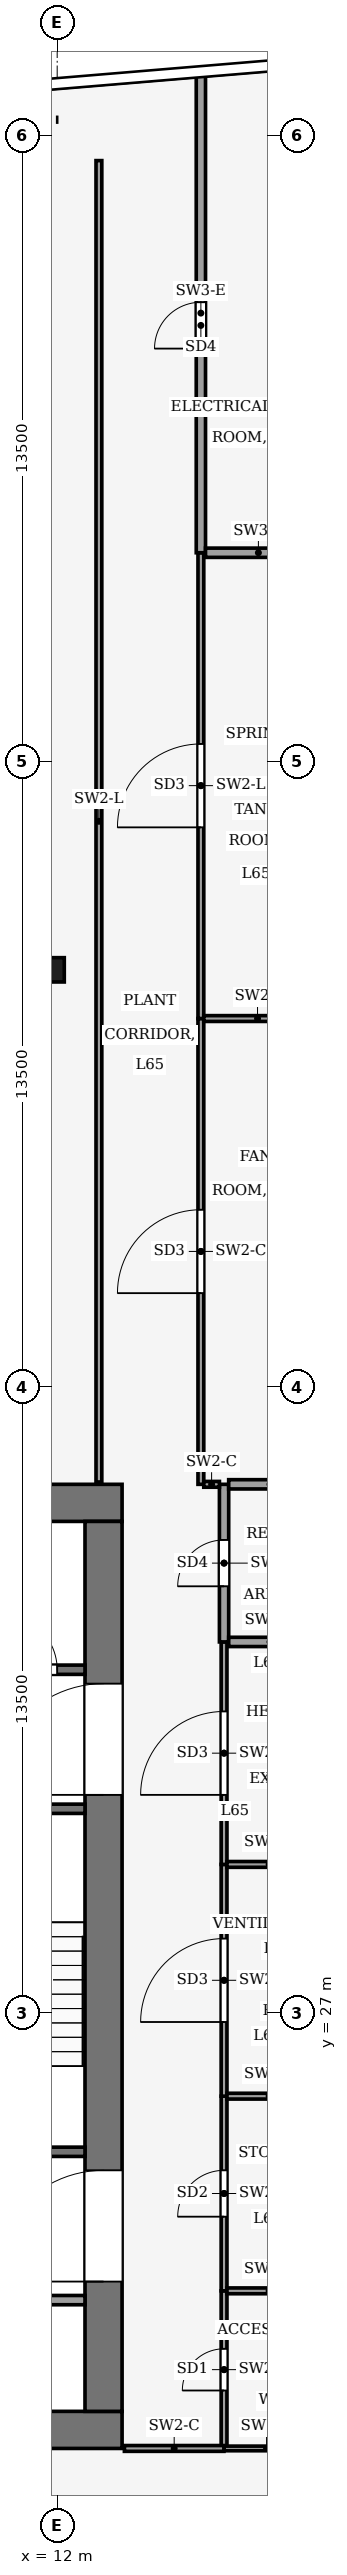
"""IFC4 building model, lengths in metres.
Left out: names, types, materials, properties, quantities, classifications, styles, units other than length and angle.
Written with IfcOpenShell. Run it as: python <this file> out.ifc"""

import sys

from ifc_helpers import new_model, si_unit, direction, frame, frame_2d, origin, origin_2d, place, context, subcontext, project, spatial, rectangle, hollow_rectangle, i_section, extrude, element, fill, save


model = new_model("IFC4")
c1 = context("Model", 3, precision=1e-05, world=origin(), true_north=direction((0.0, 1.0)))
c2 = subcontext(c1, "Body", "Model", "MODEL_VIEW")
j1 = project(units=[si_unit("LENGTHUNIT", "METRE"), si_unit("PLANEANGLEUNIT", "RADIAN")], contexts=[c1])
p1 = place(None, origin())
s1 = spatial("IfcSite", under=j1, at=p1, CompositionType="ELEMENT")
p2 = place(p1, origin())
s2 = spatial("IfcBuilding", under=s1, at=p2, CompositionType="ELEMENT")
p3 = place(p2, frame((0.0, 0.0, 282.0)))
s3 = spatial("IfcBuildingStorey", under=s2, at=p3, CompositionType="ELEMENT", Elevation=282.0)
for number, where, z_axis, x_axis in (
    (1, (-13.4, 18.0, -0.25), (0.0, 0.0, 1.0), (1.0, 0.0, 0.0)),
    (2, (-13.4, 38.0, -0.25), (0.0, 0.0, 1.0), (1.0, 0.0, 0.0)),
):
    element("IfcWall", number, at=place(p3, frame(where, z_axis=z_axis, x_axis=x_axis)), inside=s3, PredefinedType="SHEAR", context=c2, shape_type="SweptSolid", body=[
        extrude(rectangle(XDim=26.8, YDim=0.8, at=frame_2d((13.4, 0.0))), origin(), (0.0, 0.0, 1.0), 7.12),
    ])
p4 = place(p3, frame((13.0, 18.4, -0.25), z_axis=(0.0, 0.0, 1.0), x_axis=(0.0, 1.0, 0.0)))
e3 = element("IfcWall", 3, at=p4, inside=s3, PredefinedType="SHEAR", context=c2, shape_type="SweptSolid", body=[
    extrude(rectangle(XDim=19.2, YDim=0.8, at=frame_2d((9.6, 0.0))), origin(), (0.0, 0.0, 1.0), 7.12),
])
p5 = place(p4, frame((2.8, 0.0, 0.25)))
e4 = element("IfcOpeningElement", 4, at=p5, cuts=e3, PredefinedType="OPENING", context=c2, shape_type="SweptSolid", body=[
    extrude(rectangle(XDim=2.4, YDim=2.4, at=frame_2d((1.2, 1.2))), frame((0.0, 0.41, 0.0), z_axis=(0.0, -1.0, 0.0), x_axis=(1.0, 0.0, 0.0)), (0.0, 0.0, 1.0), 0.82),
])
p6 = place(p4, frame((13.3, 0.0, 0.25)))
e5 = element("IfcOpeningElement", 5, at=p6, cuts=e3, PredefinedType="OPENING", context=c2, shape_type="SweptSolid", body=[
    extrude(rectangle(XDim=2.4, YDim=2.4, at=frame_2d((1.2, 1.2))), frame((0.0, 0.41, 0.0), z_axis=(0.0, -1.0, 0.0), x_axis=(1.0, 0.0, 0.0)), (0.0, 0.0, 1.0), 0.82),
])
p7 = place(p3, frame((12.0, 67.75, 0.029), z_axis=(0.0, 0.025979412411, 0.999662478105), x_axis=(-1.0, 0.0, 0.0)))
e6 = element("IfcColumn", 6, at=p7, inside=s3, PredefinedType="COLUMN", context=c2, shape_type="SweptSolid", body=[
    extrude(hollow_rectangle(XDim=0.6, YDim=0.6, WallThickness=0.025, at=origin_2d()), origin(), (0.0, 0.0, 1.0), 6.945),
])
p8 = place(p3, frame((12.0, 49.5, 0.0), z_axis=(0.0, 0.0, 1.0), x_axis=(1.0, 0.0, 0.0)))
e7 = element("IfcColumn", 7, at=p8, inside=s3, PredefinedType="COLUMN", context=c2, shape_type="SweptSolid", body=[
    extrude(i_section(OverallWidth=0.306, OverallDepth=0.524, WebThickness=0.012, FlangeThickness=0.04, FilletRadius=0.027, at=origin_2d()), origin(), (0.0, 0.0, 1.0), 7.0),
])
p9 = place(p3, frame((6.0, 20.8, 0.0), z_axis=(0.0, 0.0, 1.0), x_axis=(1.0, 0.0, 0.0)))
e8 = element("IfcWall", 8, at=p9, inside=s3, PredefinedType="PARTITIONING", context=c2, shape_type="SweptSolid", body=[
    extrude(rectangle(XDim=6.6, YDim=0.2, at=frame_2d((3.3, 0.0))), origin(), (0.0, 0.0, 1.0), 6.87),
])
p10 = place(p9, frame((2.8, 0.0, 0.0)))
e9 = element("IfcOpeningElement", 9, at=p10, cuts=e8, PredefinedType="OPENING", context=c2, shape_type="SweptSolid", body=[
    extrude(rectangle(XDim=1.0, YDim=2.1, at=frame_2d((0.5, 1.05))), frame((0.0, 0.11, 0.0), z_axis=(0.0, -1.0, 0.0), x_axis=(1.0, 0.0, 0.0)), (0.0, 0.0, 1.0), 0.22),
])
p11 = place(p3, frame((6.0, 24.0, 0.0), z_axis=(0.0, 0.0, 1.0), x_axis=(1.0, 0.0, 0.0)))
e10 = element("IfcWall", 10, at=p11, inside=s3, PredefinedType="PARTITIONING", context=c2, shape_type="SweptSolid", body=[
    extrude(rectangle(XDim=6.6, YDim=0.2, at=frame_2d((3.3, 0.0))), origin(), (0.0, 0.0, 1.0), 6.87),
])
p12 = place(p11, frame((0.9, 0.0, 0.0)))
e11 = element("IfcOpeningElement", 11, at=p12, cuts=e10, PredefinedType="OPENING", context=c2, shape_type="SweptSolid", body=[
    extrude(rectangle(XDim=1.0, YDim=2.1, at=frame_2d((0.5, 1.05))), frame((0.0, 0.11, 0.0), z_axis=(0.0, -1.0, 0.0), x_axis=(1.0, 0.0, 0.0)), (0.0, 0.0, 1.0), 0.22),
])
p13 = place(p11, frame((4.4, 0.0, 0.0)))
e12 = element("IfcOpeningElement", 12, at=p13, cuts=e10, PredefinedType="OPENING", context=c2, shape_type="SweptSolid", body=[
    extrude(rectangle(XDim=1.2, YDim=2.2, at=frame_2d((0.6, 1.1))), frame((0.0, 0.11, 0.0), z_axis=(0.0, -1.0, 0.0), x_axis=(1.0, 0.0, 0.0)), (0.0, 0.0, 1.0), 0.22),
])
p14 = place(p3, frame((6.0, 31.4, 0.0), z_axis=(0.0, 0.0, 1.0), x_axis=(1.0, 0.0, 0.0)))
e13 = element("IfcWall", 13, at=p14, inside=s3, PredefinedType="PARTITIONING", context=c2, shape_type="SweptSolid", body=[
    extrude(rectangle(XDim=6.6, YDim=0.2, at=frame_2d((3.3, 0.0))), origin(), (0.0, 0.0, 1.0), 6.87),
])
p15 = place(p3, frame((6.0, 34.4, 0.0), z_axis=(0.0, 0.0, 1.0), x_axis=(1.0, 0.0, 0.0)))
e14 = element("IfcWall", 14, at=p15, inside=s3, PredefinedType="PARTITIONING", context=c2, shape_type="SweptSolid", body=[
    extrude(rectangle(XDim=6.6, YDim=0.2, at=frame_2d((3.3, 0.0))), origin(), (0.0, 0.0, 1.0), 6.87),
])
p16 = place(p15, frame((4.8, 0.0, 0.0)))
e15 = element("IfcOpeningElement", 15, at=p16, cuts=e14, PredefinedType="OPENING", context=c2, shape_type="SweptSolid", body=[
    extrude(rectangle(XDim=1.2, YDim=2.2, at=frame_2d((0.6, 1.1))), frame((0.0, 0.11, 0.0), z_axis=(0.0, -1.0, 0.0), x_axis=(1.0, 0.0, 0.0)), (0.0, 0.0, 1.0), 0.22),
])
p17 = place(p3, frame((15.6, 17.6, 0.0), z_axis=(0.0, 0.0, 1.0), x_axis=(0.0, 1.0, 0.0)))
e16 = element("IfcWall", 16, at=p17, inside=s3, PredefinedType="PARTITIONING", context=c2, shape_type="SweptSolid", body=[
    extrude(rectangle(XDim=3.4, YDim=0.125, at=frame_2d((1.7, 0.0))), origin(), (0.0, 0.0, 1.0), 6.14),
])
p18 = place(p17, frame((1.25, 0.0, 0.0)))
e17 = element("IfcOpeningElement", 17, at=p18, cuts=e16, PredefinedType="OPENING", context=c2, shape_type="SweptSolid", body=[
    extrude(rectangle(XDim=0.9, YDim=2.1, at=frame_2d((0.45, 1.05))), frame((0.0, 0.073, 0.0), z_axis=(0.0, -1.0, 0.0), x_axis=(1.0, 0.0, 0.0)), (0.0, 0.0, 1.0), 0.145),
])
p19 = place(p3, frame((15.6, 21.0, 0.0), z_axis=(0.0, 0.0, 1.0), x_axis=(0.0, 1.0, 0.0)))
e18 = element("IfcWall", 18, at=p19, inside=s3, PredefinedType="PARTITIONING", context=c2, shape_type="SweptSolid", body=[
    extrude(rectangle(XDim=4.2, YDim=0.125, at=frame_2d((2.1, 0.0))), origin(), (0.0, 0.0, 1.0), 6.48),
])
p20 = place(p19, frame((1.6, 0.0, 0.0)))
e19 = element("IfcOpeningElement", 19, at=p20, cuts=e18, PredefinedType="OPENING", context=c2, shape_type="SweptSolid", body=[
    extrude(rectangle(XDim=1.0, YDim=2.1, at=frame_2d((0.5, 1.05))), frame((0.0, 0.073, 0.0), z_axis=(0.0, -1.0, 0.0), x_axis=(1.0, 0.0, 0.0)), (0.0, 0.0, 1.0), 0.145),
])
p21 = place(p3, frame((15.6, 25.2, 0.0), z_axis=(0.0, 0.0, 1.0), x_axis=(0.0, 1.0, 0.0)))
e20 = element("IfcWall", 20, at=p21, inside=s3, PredefinedType="PARTITIONING", context=c2, shape_type="SweptSolid", body=[
    extrude(rectangle(XDim=5.0, YDim=0.125, at=frame_2d((2.5, 0.0))), origin(), (0.0, 0.0, 1.0), 6.48),
])
p22 = place(p21, frame((1.6, 0.0, 0.0)))
e21 = element("IfcOpeningElement", 21, at=p22, cuts=e20, PredefinedType="OPENING", context=c2, shape_type="SweptSolid", body=[
    extrude(rectangle(XDim=1.8, YDim=2.4, at=frame_2d((0.9, 1.2))), frame((0.0, 0.073, 0.0), z_axis=(0.0, -1.0, 0.0), x_axis=(1.0, 0.0, 0.0)), (0.0, 0.0, 1.0), 0.145),
])
p23 = place(p3, frame((15.6, 30.2, 0.0), z_axis=(0.0, 0.0, 1.0), x_axis=(0.0, 1.0, 0.0)))
e22 = element("IfcWall", 22, at=p23, inside=s3, PredefinedType="PARTITIONING", context=c2, shape_type="SweptSolid", body=[
    extrude(rectangle(XDim=4.8, YDim=0.125, at=frame_2d((2.4, 0.0))), origin(), (0.0, 0.0, 1.0), 6.48),
])
p24 = place(p23, frame((1.5, 0.0, 0.0)))
e23 = element("IfcOpeningElement", 23, at=p24, cuts=e22, PredefinedType="OPENING", context=c2, shape_type="SweptSolid", body=[
    extrude(rectangle(XDim=1.8, YDim=2.4, at=frame_2d((0.9, 1.2))), frame((0.0, 0.073, 0.0), z_axis=(0.0, -1.0, 0.0), x_axis=(1.0, 0.0, 0.0)), (0.0, 0.0, 1.0), 0.145),
])
p25 = place(p3, frame((15.6, 35.0, 0.0), z_axis=(0.0, 0.0, 1.0), x_axis=(0.0, 1.0, 0.0)))
e24 = element("IfcWall", 24, at=p25, inside=s3, PredefinedType="PARTITIONING", context=c2, shape_type="SweptSolid", body=[
    extrude(rectangle(XDim=3.4, YDim=0.2, at=frame_2d((1.7, 0.0))), origin(), (0.0, 0.0, 1.0), 6.14),
])
p26 = place(p25, frame((1.2, 0.0, 0.0)))
e25 = element("IfcOpeningElement", 25, at=p26, cuts=e24, PredefinedType="OPENING", context=c2, shape_type="SweptSolid", body=[
    extrude(rectangle(XDim=1.0, YDim=2.1, at=frame_2d((0.5, 1.05))), frame((0.0, 0.11, 0.0), z_axis=(0.0, -1.0, 0.0), x_axis=(1.0, 0.0, 0.0)), (0.0, 0.0, 1.0), 0.22),
])
p27 = place(p3, frame((15.1, 38.4, 0.0), z_axis=(0.0, 0.0, 1.0), x_axis=(0.0, 1.0, 0.0)))
e26 = element("IfcWall", 26, at=p27, inside=s3, PredefinedType="PARTITIONING", context=c2, shape_type="SweptSolid", body=[
    extrude(rectangle(XDim=10.049, YDim=0.125, at=frame_2d((5.024, 0.0))), origin(), (0.0, 0.0, 1.0), 6.14),
])
p28 = place(p27, frame((4.125, 0.0, 0.0)))
e27 = element("IfcOpeningElement", 27, at=p28, cuts=e26, PredefinedType="OPENING", context=c2, shape_type="SweptSolid", body=[
    extrude(rectangle(XDim=1.8, YDim=2.4, at=frame_2d((0.9, 1.2))), frame((0.0, 0.073, 0.0), z_axis=(0.0, -1.0, 0.0), x_axis=(1.0, 0.0, 0.0)), (0.0, 0.0, 1.0), 0.145),
])
p29 = place(p3, frame((15.163, 38.4, 0.0), z_axis=(0.0, 0.0, 1.0), x_axis=(1.0, 0.0, 0.0)))
e28 = element("IfcWall", 28, at=p29, inside=s3, PredefinedType="PARTITIONING", context=c2, shape_type="SweptSolid", body=[
    extrude(rectangle(XDim=0.337, YDim=0.125, at=frame_2d((0.169, 0.0))), origin(), (0.0, 0.0, 1.0), 6.14),
])
p30 = place(p3, frame((15.1, 48.449, 0.0), z_axis=(0.0, 0.0, 1.0), x_axis=(0.0, 1.0, 0.0)))
e29 = element("IfcWall", 29, at=p30, inside=s3, PredefinedType="PARTITIONING", context=c2, shape_type="SweptSolid", body=[
    extrude(rectangle(XDim=10.049, YDim=0.125, at=frame_2d((5.024, 0.0))), origin(), (0.0, 0.0, 1.0), 6.35),
])
p31 = place(p30, frame((4.125, 0.0, 0.0)))
e30 = element("IfcOpeningElement", 30, at=p31, cuts=e29, PredefinedType="OPENING", context=c2, shape_type="SweptSolid", body=[
    extrude(rectangle(XDim=1.8, YDim=2.4, at=frame_2d((0.9, 1.2))), frame((0.0, 0.073, 0.0), z_axis=(0.0, -1.0, 0.0), x_axis=(1.0, 0.0, 0.0)), (0.0, 0.0, 1.0), 0.145),
])
p32 = place(p3, frame((15.1, 58.498, 0.0), z_axis=(0.0, 0.0, 1.0), x_axis=(0.0, 1.0, 0.0)))
e31 = element("IfcWall", 31, at=p32, inside=s3, PredefinedType="PARTITIONING", context=c2, shape_type="SweptSolid", body=[
    extrude(rectangle(XDim=10.34, YDim=0.2, at=frame_2d((5.17, 0.0))), origin(), (0.0, 0.0, 1.0), 6.04),
])
p33 = place(p32, frame((4.405, 0.0, 0.0)))
e32 = element("IfcOpeningElement", 32, at=p33, cuts=e31, PredefinedType="OPENING", context=c2, shape_type="SweptSolid", body=[
    extrude(rectangle(XDim=1.0, YDim=2.1, at=frame_2d((0.5, 1.05))), frame((0.0, 0.11, 0.0), z_axis=(0.0, -1.0, 0.0), x_axis=(1.0, 0.0, 0.0)), (0.0, 0.0, 1.0), 0.22),
])
for number, where, z_axis, x_axis in (
    (33, (15.663, 21.0, 0.0), (0.0, 0.0, 1.0), (1.0, 0.0, 0.0)),
    (34, (15.663, 25.2, 0.0), (0.0, 0.0, 1.0), (1.0, 0.0, 0.0)),
    (35, (15.663, 30.2, 0.0), (0.0, 0.0, 1.0), (1.0, 0.0, 0.0)),
):
    element("IfcWall", number, at=place(p3, frame(where, z_axis=z_axis, x_axis=x_axis)), inside=s3, PredefinedType="PARTITIONING", context=c2, shape_type="SweptSolid", body=[
        extrude(rectangle(XDim=1.819, YDim=0.125, at=frame_2d((0.91, 0.0))), origin(), (0.0, 0.0, 1.0), 6.87),
    ])
p34 = place(p3, frame((15.7, 35.0, 0.0), z_axis=(0.0, 0.0, 1.0), x_axis=(1.0, 0.0, 0.0)))
e36 = element("IfcWall", 36, at=p34, inside=s3, PredefinedType="PARTITIONING", context=c2, shape_type="SweptSolid", body=[
    extrude(rectangle(XDim=1.782, YDim=0.2, at=frame_2d((0.891, 0.0))), origin(), (0.0, 0.0, 1.0), 6.87),
])
p35 = place(p3, frame((15.7, 38.4, 0.0), z_axis=(0.0, 0.0, 1.0), x_axis=(1.0, 0.0, 0.0)))
e37 = element("IfcWall", 37, at=p35, inside=s3, PredefinedType="PARTITIONING", context=c2, shape_type="SweptSolid", body=[
    extrude(rectangle(XDim=1.782, YDim=0.2, at=frame_2d((0.891, 0.0))), origin(), (0.0, 0.0, 1.0), 6.14),
])
p36 = place(p3, frame((15.163, 48.449, 0.0), z_axis=(0.0, 0.0, 1.0), x_axis=(1.0, 0.0, 0.0)))
e38 = element("IfcWall", 38, at=p36, inside=s3, PredefinedType="PARTITIONING", context=c2, shape_type="SweptSolid", body=[
    extrude(rectangle(XDim=2.319, YDim=0.125, at=frame_2d((1.16, 0.0))), origin(), (0.0, 0.0, 1.0), 6.39),
])
p37 = place(p3, frame((15.2, 58.498, 0.0), z_axis=(0.0, 0.0, 1.0), x_axis=(1.0, 0.0, 0.0)))
e39 = element("IfcWall", 39, at=p37, inside=s3, PredefinedType="PARTITIONING", context=c2, shape_type="SweptSolid", body=[
    extrude(rectangle(XDim=2.282, YDim=0.2, at=frame_2d((1.141, 0.0))), origin(), (0.0, 0.0, 1.0), 6.24),
])
p38 = place(p3, frame((12.9, 38.45, 0.0), z_axis=(0.0, 0.0, 1.0), x_axis=(0.0, 1.0, 0.0)))
e40 = element("IfcWall", 40, at=p38, inside=s3, PredefinedType="PARTITIONING", context=c2, shape_type="SweptSolid", body=[
    extrude(rectangle(XDim=28.508, YDim=0.125, at=frame_2d((14.254, 0.0))), origin(), (0.0, 0.0, 1.0), 6.35),
])
p39 = place(p3, frame((15.598, 17.6, 0.0), z_axis=(0.0, 0.0, 1.0), x_axis=(-1.0, 0.0, 0.0)))
e41 = element("IfcWall", 41, at=p39, inside=s3, PredefinedType="PARTITIONING", context=c2, shape_type="SweptSolid", body=[
    extrude(rectangle(XDim=2.148, YDim=0.125, at=frame_2d((1.074, 0.0))), origin(), (0.0, 0.0, 1.0), 6.14),
])
p40 = place(p3, frame((17.432, 17.6, 0.0), z_axis=(0.0, 0.0, 1.0), x_axis=(-1.0, 0.0, 0.0)))
e42 = element("IfcWall", 42, at=p40, inside=s3, PredefinedType="PARTITIONING", context=c2, shape_type="SweptSolid", body=[
    extrude(rectangle(XDim=1.83, YDim=0.1, at=frame_2d((0.915, 0.0))), origin(), (0.0, 0.0, 1.0), 6.14),
])
p41 = place(p16, origin())
e43 = element("IfcDoor", 43, at=p41, inside=s3, OperationType="SINGLE_SWING_LEFT", PredefinedType="DOOR", context=c2, shape_type="SweptSolid", body=[
    extrude(rectangle(XDim=1.2, YDim=2.2, at=frame_2d((0.6, 1.1))), frame((0.0, 0.025, 0.0), z_axis=(0.0, -1.0, 0.0), x_axis=(1.0, 0.0, 0.0)), (0.0, 0.0, 1.0), 0.05),
])
fill(e15, e43)
p42 = place(p5, origin())
e44 = element("IfcDoor", 44, at=p42, inside=s3, OperationType="DOUBLE_DOOR_SINGLE_SWING", PredefinedType="DOOR", context=c2, shape_type="SweptSolid", body=[
    extrude(rectangle(XDim=2.4, YDim=2.4, at=frame_2d((1.2, 1.2))), frame((0.0, 0.025, 0.0), z_axis=(0.0, -1.0, 0.0), x_axis=(1.0, 0.0, 0.0)), (0.0, 0.0, 1.0), 0.05),
])
fill(e4, e44)
p43 = place(p6, origin())
e45 = element("IfcDoor", 45, at=p43, inside=s3, OperationType="DOUBLE_DOOR_SINGLE_SWING", PredefinedType="DOOR", context=c2, shape_type="SweptSolid", body=[
    extrude(rectangle(XDim=2.4, YDim=2.4, at=frame_2d((1.2, 1.2))), frame((0.0, 0.025, 0.0), z_axis=(0.0, -1.0, 0.0), x_axis=(1.0, 0.0, 0.0)), (0.0, 0.0, 1.0), 0.05),
])
fill(e5, e45)
p44 = place(p18, origin())
e46 = element("IfcDoor", 46, at=p44, inside=s3, OperationType="SINGLE_SWING_LEFT", PredefinedType="DOOR", context=c2, shape_type="SweptSolid", body=[
    extrude(rectangle(XDim=0.9, YDim=2.1, at=frame_2d((0.45, 1.05))), frame((0.0, 0.025, 0.0), z_axis=(0.0, -1.0, 0.0), x_axis=(1.0, 0.0, 0.0)), (0.0, 0.0, 1.0), 0.05),
])
fill(e17, e46)
p45 = place(p20, origin())
e47 = element("IfcDoor", 47, at=p45, inside=s3, OperationType="SINGLE_SWING_RIGHT", PredefinedType="DOOR", context=c2, shape_type="SweptSolid", body=[
    extrude(rectangle(XDim=1.0, YDim=2.1, at=frame_2d((0.5, 1.05))), frame((0.0, 0.025, 0.0), z_axis=(0.0, -1.0, 0.0), x_axis=(1.0, 0.0, 0.0)), (0.0, 0.0, 1.0), 0.05),
])
fill(e19, e47)
p46 = place(p22, origin())
e48 = element("IfcDoor", 48, at=p46, inside=s3, OperationType="DOUBLE_DOOR_SINGLE_SWING", PredefinedType="DOOR", context=c2, shape_type="SweptSolid", body=[
    extrude(rectangle(XDim=1.8, YDim=2.4, at=frame_2d((0.9, 1.2))), frame((0.0, 0.025, 0.0), z_axis=(0.0, -1.0, 0.0), x_axis=(1.0, 0.0, 0.0)), (0.0, 0.0, 1.0), 0.05),
])
fill(e21, e48)
p47 = place(p24, origin())
e49 = element("IfcDoor", 49, at=p47, inside=s3, OperationType="DOUBLE_DOOR_SINGLE_SWING", PredefinedType="DOOR", context=c2, shape_type="SweptSolid", body=[
    extrude(rectangle(XDim=1.8, YDim=2.4, at=frame_2d((0.9, 1.2))), frame((0.0, 0.025, 0.0), z_axis=(0.0, -1.0, 0.0), x_axis=(1.0, 0.0, 0.0)), (0.0, 0.0, 1.0), 0.05),
])
fill(e23, e49)
p48 = place(p26, origin())
e50 = element("IfcDoor", 50, at=p48, inside=s3, OperationType="SINGLE_SWING_LEFT", PredefinedType="DOOR", context=c2, shape_type="SweptSolid", body=[
    extrude(rectangle(XDim=1.0, YDim=2.1, at=frame_2d((0.5, 1.05))), frame((0.0, 0.025, 0.0), z_axis=(0.0, -1.0, 0.0), x_axis=(1.0, 0.0, 0.0)), (0.0, 0.0, 1.0), 0.05),
])
fill(e25, e50)
p49 = place(p28, origin())
e51 = element("IfcDoor", 51, at=p49, inside=s3, OperationType="DOUBLE_DOOR_SINGLE_SWING", PredefinedType="DOOR", context=c2, shape_type="SweptSolid", body=[
    extrude(rectangle(XDim=1.8, YDim=2.4, at=frame_2d((0.9, 1.2))), frame((0.0, 0.025, 0.0), z_axis=(0.0, -1.0, 0.0), x_axis=(1.0, 0.0, 0.0)), (0.0, 0.0, 1.0), 0.05),
])
fill(e27, e51)
p50 = place(p31, origin())
e52 = element("IfcDoor", 52, at=p50, inside=s3, OperationType="DOUBLE_DOOR_SINGLE_SWING", PredefinedType="DOOR", context=c2, shape_type="SweptSolid", body=[
    extrude(rectangle(XDim=1.8, YDim=2.4, at=frame_2d((0.9, 1.2))), frame((0.0, 0.025, 0.0), z_axis=(0.0, -1.0, 0.0), x_axis=(1.0, 0.0, 0.0)), (0.0, 0.0, 1.0), 0.05),
])
fill(e30, e52)
p51 = place(p33, origin())
e53 = element("IfcDoor", 53, at=p51, inside=s3, OperationType="SINGLE_SWING_LEFT", PredefinedType="DOOR", context=c2, shape_type="SweptSolid", body=[
    extrude(rectangle(XDim=1.0, YDim=2.1, at=frame_2d((0.5, 1.05))), frame((0.0, 0.025, 0.0), z_axis=(0.0, -1.0, 0.0), x_axis=(1.0, 0.0, 0.0)), (0.0, 0.0, 1.0), 0.05),
])
fill(e32, e53)
save(model, sys.argv[1])
